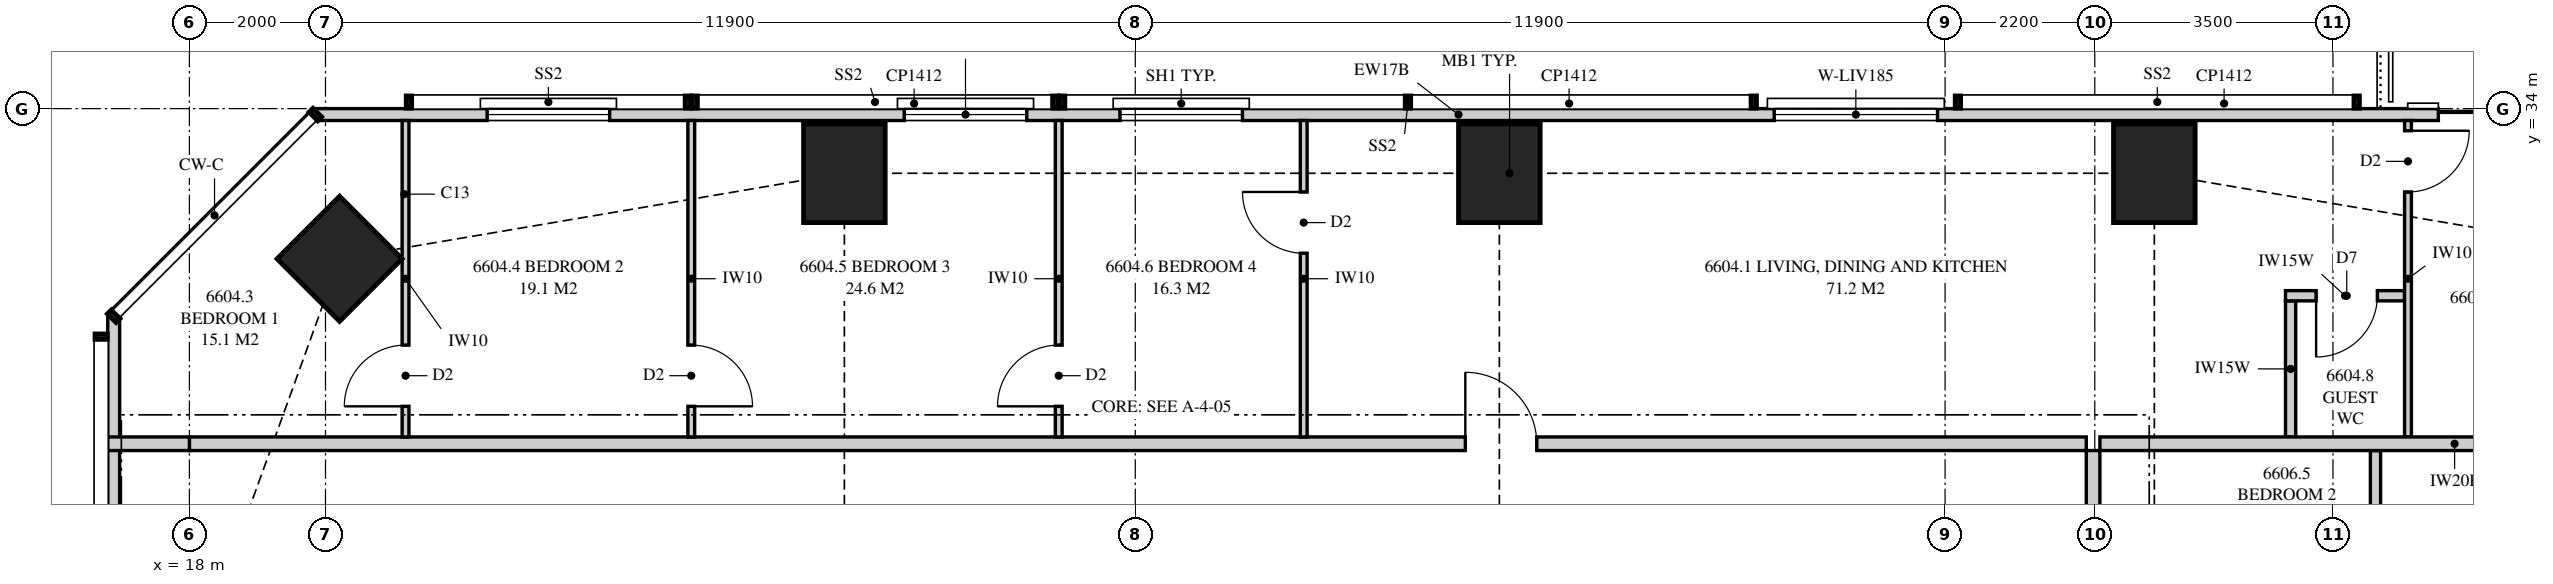
"""IFC4 building model, lengths in metres.
Left out: names, types, materials, properties, quantities, classifications, styles, units other than length and angle.
Written with IfcOpenShell. Run it as: python <this file> out.ifc"""

import sys

from ifc_helpers import new_model, si_unit, direction, frame, frame_2d, origin, origin_2d, place, context, subcontext, project, spatial, polyline, rectangle, outline, extrude, element, fill, save


model = new_model("IFC4")
c1 = context("Model", 3, precision=1e-05, world=origin(), true_north=direction((0.0, 1.0)))
c2 = subcontext(c1, "Body", "Model", "MODEL_VIEW")
j1 = project(units=[si_unit("LENGTHUNIT", "METRE"), si_unit("PLANEANGLEUNIT", "RADIAN")], contexts=[c1])
p1 = place(None, origin())
s1 = spatial("IfcSite", under=j1, at=p1, CompositionType="ELEMENT")
p2 = place(p1, origin())
s2 = spatial("IfcBuilding", under=s1, at=p2, CompositionType="ELEMENT")
p3 = place(p2, frame((0.0, 0.0, 242.45)))
s3 = spatial("IfcBuildingStorey", under=s2, at=p3, CompositionType="ELEMENT", Elevation=242.45)
for number, where, z_axis, x_axis in (
    (1, (46.875, 33.05, 0.0), (0.0, 0.0, 1.0), (0.0, 1.0, 0.0)),
    (2, (37.25, 33.05, 0.0), (0.0, 0.0, 1.0), (0.0, 1.0, 0.0)),
    (3, (27.625, 33.05, 0.0), (0.0, 0.0, 1.0), (0.0, 1.0, 0.0)),
):
    element("IfcColumn", number, at=place(p3, frame(where, z_axis=z_axis, x_axis=x_axis)), inside=s3, PredefinedType="COLUMN", context=c2, shape_type="SweptSolid", body=[
        extrude(rectangle(XDim=1.45, YDim=1.2, at=origin_2d()), origin(), (0.0, 0.0, 1.0), 3.5),
    ])
p4 = place(p3, frame((20.207, 31.793, 0.0), z_axis=(0.0, 0.0, 1.0), x_axis=(0.707106781187, 0.707106781187, 0.0)))
e4 = element("IfcColumn", 4, at=p4, inside=s3, PredefinedType="COLUMN", context=c2, shape_type="SweptSolid", body=[
    extrude(rectangle(XDim=1.3, YDim=1.3, at=origin_2d()), origin(), (0.0, 0.0, 1.0), 3.5),
])
p5 = place(p3, frame((53.449, 33.913, 0.0), z_axis=(0.0, 0.0, 1.0), x_axis=(-1.0, 0.0, 0.0)))
e5 = element("IfcWall", 5, at=p5, inside=s3, PredefinedType="SOLIDWALL", context=c2, shape_type="SweptSolid", body=[
    extrude(outline(polyline([(0.0, 0.0), (33.597, 0.0), (33.597, 3.26), (26.039, 3.26), (26.039, 2.3), (25.955, 2.3), (25.955, 3.26), (25.824, 3.26), (25.824, 2.3), (6.574, 2.3), (6.574, 3.26), (6.442, 3.26), (6.442, 2.3), (6.359, 2.3), (6.359, 3.26), (0.0, 3.26), (0.0, 0.0)])), frame((0.0, 0.087, 0.0), z_axis=(0.0, -1.0, 0.0), x_axis=(1.0, 0.0, 0.0)), (0.0, 0.0, 1.0), 0.175),
])
p6 = place(p5, frame((0.6, 0.0, 0.0)))
e6 = element("IfcOpeningElement", 6, at=p6, cuts=e5, PredefinedType="OPENING", context=c2, shape_type="SweptSolid", body=[
    extrude(rectangle(XDim=1.8, YDim=2.25, at=frame_2d((0.9, 1.125))), frame((0.0, 0.097, 0.0), z_axis=(0.0, -1.0, 0.0), x_axis=(1.0, 0.0, 0.0)), (0.0, 0.0, 1.0), 0.195),
])
p7 = place(p5, frame((9.76, 0.0, 0.4)))
e7 = element("IfcOpeningElement", 7, at=p7, cuts=e5, PredefinedType="OPENING", context=c2, shape_type="SweptSolid", body=[
    extrude(rectangle(XDim=2.4, YDim=1.85, at=frame_2d((1.2, 0.925))), frame((0.0, 0.097, 0.0), z_axis=(0.0, -1.0, 0.0), x_axis=(1.0, 0.0, 0.0)), (0.0, 0.0, 1.0), 0.195),
])
p8 = place(p5, frame((19.974, 0.0, 0.4)))
e8 = element("IfcOpeningElement", 8, at=p8, cuts=e5, PredefinedType="OPENING", context=c2, shape_type="SweptSolid", body=[
    extrude(rectangle(XDim=1.8, YDim=1.85, at=frame_2d((0.9, 0.925))), frame((0.0, 0.097, 0.0), z_axis=(0.0, -1.0, 0.0), x_axis=(1.0, 0.0, 0.0)), (0.0, 0.0, 1.0), 0.195),
])
p9 = place(p5, frame((23.144, 0.0, 0.4)))
e9 = element("IfcOpeningElement", 9, at=p9, cuts=e5, PredefinedType="OPENING", context=c2, shape_type="SweptSolid", body=[
    extrude(rectangle(XDim=1.8, YDim=1.85, at=frame_2d((0.9, 0.925))), frame((0.0, 0.097, 0.0), z_axis=(0.0, -1.0, 0.0), x_axis=(1.0, 0.0, 0.0)), (0.0, 0.0, 1.0), 0.195),
])
p10 = place(p5, frame((29.273, 0.0, 0.4)))
e10 = element("IfcOpeningElement", 10, at=p10, cuts=e5, PredefinedType="OPENING", context=c2, shape_type="SweptSolid", body=[
    extrude(rectangle(XDim=1.8, YDim=1.85, at=frame_2d((0.9, 0.925))), frame((0.0, 0.097, 0.0), z_axis=(0.0, -1.0, 0.0), x_axis=(1.0, 0.0, 0.0)), (0.0, 0.0, 1.0), 0.195),
])
p11 = place(p3, frame((16.887, 30.949, 0.0), z_axis=(0.0, 0.0, 1.0), x_axis=(0.0, -1.0, 0.0)))
e11 = element("IfcWall", 11, at=p11, inside=s3, PredefinedType="SOLIDWALL", context=c2, shape_type="SweptSolid", body=[
    extrude(outline(polyline([(0.0, 0.0), (27.897, 0.0), (27.897, 3.26), (18.148, 3.26), (18.148, 2.3), (18.125, 2.3), (18.125, 3.26), (17.949, 3.26), (17.949, 2.3), (5.949, 2.3), (5.949, 3.26), (0.0, 3.26), (0.0, 0.0)])), frame((0.0, 0.087, 0.0), z_axis=(0.0, -1.0, 0.0), x_axis=(1.0, 0.0, 0.0)), (0.0, 0.0, 1.0), 0.175),
])
p12 = place(p11, frame((11.849, 0.0, 0.4)))
e12 = element("IfcOpeningElement", 12, at=p12, cuts=e11, PredefinedType="OPENING", context=c2, shape_type="SweptSolid", body=[
    extrude(rectangle(XDim=1.2, YDim=1.85, at=frame_2d((0.6, 0.925))), frame((0.0, 0.097, 0.0), z_axis=(0.0, -1.0, 0.0), x_axis=(1.0, 0.0, 0.0)), (0.0, 0.0, 1.0), 0.195),
])
p13 = place(p11, frame((24.311, 0.0, 0.4)))
e13 = element("IfcOpeningElement", 13, at=p13, cuts=e11, PredefinedType="OPENING", context=c2, shape_type="SweptSolid", body=[
    extrude(rectangle(XDim=2.4, YDim=1.85, at=frame_2d((1.2, 0.925))), frame((0.0, 0.097, 0.0), z_axis=(0.0, -1.0, 0.0), x_axis=(1.0, 0.0, 0.0)), (0.0, 0.0, 1.0), 0.195),
])
p14 = place(p3, frame((18.0, 29.075, 0.0), z_axis=(0.0, 0.0, 1.0), x_axis=(1.0, 0.0, 0.0)))
e14 = element("IfcWall", 14, at=p14, inside=s3, PredefinedType="PARTITIONING", context=c2, shape_type="SweptSolid", body=[
    extrude(outline(polyline([(0.0, 0.0), (27.875, 0.0), (27.875, 3.26), (27.875, 2.66), (27.565, 2.66), (27.565, 3.26), (20.56, 3.26), (20.56, 2.66), (17.94, 2.66), (17.94, 3.26), (10.935, 3.26), (10.935, 2.66), (8.315, 2.66), (8.315, 3.26), (2.192, 3.26), (2.192, 2.3), (0.256, 2.3), (0.256, 3.26), (0.0, 3.26), (0.0, 0.0)])), frame((0.0, 0.1, 0.0), z_axis=(0.0, -1.0, 0.0), x_axis=(1.0, 0.0, 0.0)), (0.0, 0.0, 1.0), 0.2),
])
p15 = place(p14, frame((18.75, 0.0, 0.0)))
e15 = element("IfcOpeningElement", 15, at=p15, cuts=e14, PredefinedType="OPENING", context=c2, shape_type="SweptSolid", body=[
    extrude(rectangle(XDim=1.05, YDim=2.2, at=frame_2d((0.525, 1.1))), frame((0.0, 0.11, 0.0), z_axis=(0.0, -1.0, 0.0), x_axis=(1.0, 0.0, 0.0)), (0.0, 0.0, 1.0), 0.22),
])
p16 = place(p3, frame((21.176, 33.825, 0.0), z_axis=(0.0, 0.0, 1.0), x_axis=(0.0, -1.0, 0.0)))
e16 = element("IfcWall", 16, at=p16, inside=s3, PredefinedType="PARTITIONING", context=c2, shape_type="SweptSolid", body=[
    extrude(outline(polyline([(0.0, 0.0), (4.65, 0.0), (4.65, 3.26), (2.74, 3.26), (2.74, 2.3), (0.996, 2.3), (0.996, 3.26), (0.0, 3.26), (0.0, 0.0)])), frame((0.0, 0.05, 0.0), z_axis=(0.0, -1.0, 0.0), x_axis=(1.0, 0.0, 0.0)), (0.0, 0.0, 1.0), 0.1),
])
p17 = place(p16, frame((3.3, 0.0, 0.0)))
e17 = element("IfcOpeningElement", 17, at=p17, cuts=e16, PredefinedType="OPENING", context=c2, shape_type="SweptSolid", body=[
    extrude(rectangle(XDim=0.9, YDim=2.1, at=frame_2d((0.45, 1.05))), frame((0.0, 0.06, 0.0), z_axis=(0.0, -1.0, 0.0), x_axis=(1.0, 0.0, 0.0)), (0.0, 0.0, 1.0), 0.12),
])
p18 = place(p3, frame((25.375, 33.825, 0.0), z_axis=(0.0, 0.0, 1.0), x_axis=(0.0, -1.0, 0.0)))
e18 = element("IfcWall", 18, at=p18, inside=s3, PredefinedType="PARTITIONING", context=c2, shape_type="SweptSolid", body=[
    extrude(outline(polyline([(0.0, 0.0), (4.65, 0.0), (4.65, 3.26), (2.029, 3.26), (2.029, 2.3), (0.284, 2.3), (0.284, 3.26), (0.0, 3.26), (0.0, 0.0)])), frame((0.0, 0.05, 0.0), z_axis=(0.0, -1.0, 0.0), x_axis=(1.0, 0.0, 0.0)), (0.0, 0.0, 1.0), 0.1),
])
p19 = place(p18, frame((3.3, 0.0, 0.0)))
e19 = element("IfcOpeningElement", 19, at=p19, cuts=e18, PredefinedType="OPENING", context=c2, shape_type="SweptSolid", body=[
    extrude(rectangle(XDim=0.9, YDim=2.1, at=frame_2d((0.45, 1.05))), frame((0.0, 0.06, 0.0), z_axis=(0.0, -1.0, 0.0), x_axis=(1.0, 0.0, 0.0)), (0.0, 0.0, 1.0), 0.12),
])
p20 = place(p3, frame((30.775, 33.825, 0.0), z_axis=(0.0, 0.0, 1.0), x_axis=(0.0, -1.0, 0.0)))
e20 = element("IfcWall", 20, at=p20, inside=s3, PredefinedType="PARTITIONING", context=c2, shape_type="SweptSolid", body=[
    extrude(outline(polyline([(0.0, 0.0), (4.65, 0.0), (4.65, 3.26), (1.635, 3.26), (1.635, 2.3), (0.0, 2.3), (0.0, 3.26), (0.0, 0.0)])), frame((0.0, 0.05, 0.0), z_axis=(0.0, -1.0, 0.0), x_axis=(1.0, 0.0, 0.0)), (0.0, 0.0, 1.0), 0.1),
])
p21 = place(p20, frame((3.3, 0.0, 0.0)))
e21 = element("IfcOpeningElement", 21, at=p21, cuts=e20, PredefinedType="OPENING", context=c2, shape_type="SweptSolid", body=[
    extrude(rectangle(XDim=0.9, YDim=2.1, at=frame_2d((0.45, 1.05))), frame((0.0, 0.06, 0.0), z_axis=(0.0, -1.0, 0.0), x_axis=(1.0, 0.0, 0.0)), (0.0, 0.0, 1.0), 0.12),
])
p22 = place(p3, frame((34.375, 33.825, 0.0), z_axis=(0.0, 0.0, 1.0), x_axis=(0.0, -1.0, 0.0)))
e22 = element("IfcWall", 22, at=p22, inside=s3, PredefinedType="PARTITIONING", context=c2, shape_type="SweptSolid", body=[
    extrude(outline(polyline([(0.0, 0.0), (4.65, 0.0), (4.65, 3.26), (1.635, 3.26), (1.635, 2.3), (0.0, 2.3), (0.0, 3.26), (0.0, 0.0)])), frame((0.0, 0.05, 0.0), z_axis=(0.0, -1.0, 0.0), x_axis=(1.0, 0.0, 0.0)), (0.0, 0.0, 1.0), 0.1),
])
p23 = place(p22, frame((1.05, 0.0, 0.0)))
e23 = element("IfcOpeningElement", 23, at=p23, cuts=e22, PredefinedType="OPENING", context=c2, shape_type="SweptSolid", body=[
    extrude(rectangle(XDim=0.9, YDim=2.1, at=frame_2d((0.45, 1.05))), frame((0.0, 0.06, 0.0), z_axis=(0.0, -1.0, 0.0), x_axis=(1.0, 0.0, 0.0)), (0.0, 0.0, 1.0), 0.12),
])
p24 = place(p3, frame((50.603, 33.825, 0.0), z_axis=(0.0, 0.0, 1.0), x_axis=(0.0, -1.0, 0.0)))
e24 = element("IfcWall", 24, at=p24, inside=s3, PredefinedType="PARTITIONING", context=c2, shape_type="SweptSolid", body=[
    extrude(outline(polyline([(0.0, 0.0), (4.65, 0.0), (4.65, 3.26), (2.279, 3.26), (2.279, 2.3), (0.534, 2.3), (0.534, 3.26), (0.0, 3.26), (0.0, 0.0)])), frame((0.0, 0.05, 0.0), z_axis=(0.0, -1.0, 0.0), x_axis=(1.0, 0.0, 0.0)), (0.0, 0.0, 1.0), 0.1),
])
p25 = place(p24, frame((0.15, 0.0, 0.0)))
e25 = element("IfcOpeningElement", 25, at=p25, cuts=e24, PredefinedType="OPENING", context=c2, shape_type="SweptSolid", body=[
    extrude(rectangle(XDim=0.9, YDim=2.1, at=frame_2d((0.45, 1.05))), frame((0.0, 0.06, 0.0), z_axis=(0.0, -1.0, 0.0), x_axis=(1.0, 0.0, 0.0)), (0.0, 0.0, 1.0), 0.12),
])
p26 = place(p3, frame((16.8, 29.075, 0.0), z_axis=(0.0, 0.0, 1.0), x_axis=(1.0, 0.0, 0.0)))
e26 = element("IfcWall", 26, at=p26, inside=s3, PredefinedType="PARTITIONING", context=c2, shape_type="SweptSolid", body=[
    extrude(rectangle(XDim=1.2, YDim=0.2, at=frame_2d((0.6, 0.0))), origin(), (0.0, 0.0, 1.0), 3.26),
])
p27 = place(p3, frame((46.075, 29.075, 0.0), z_axis=(0.0, 0.0, 1.0), x_axis=(1.0, 0.0, 0.0)))
e27 = element("IfcWall", 27, at=p27, inside=s3, PredefinedType="PARTITIONING", context=c2, shape_type="SweptSolid", body=[
    extrude(outline(polyline([(0.0, 0.0), (10.425, 0.0), (10.425, 3.26), (9.646, 3.26), (9.646, 2.3), (7.795, 2.3), (7.795, 3.26), (2.11, 3.26), (2.11, 2.66), (0.0, 2.66), (0.0, 3.26), (0.0, 0.0)])), frame((0.0, 0.1, 0.0), z_axis=(0.0, -1.0, 0.0), x_axis=(1.0, 0.0, 0.0)), (0.0, 0.0, 1.0), 0.2),
])
p28 = place(p3, frame((45.975, 25.0, 0.0), z_axis=(0.0, 0.0, 1.0), x_axis=(0.0, 1.0, 0.0)))
e28 = element("IfcWall", 28, at=p28, inside=s3, PredefinedType="PARTITIONING", context=c2, shape_type="SweptSolid", body=[
    extrude(rectangle(XDim=3.975, YDim=0.2, at=frame_2d((1.988, 0.0))), origin(), (0.0, 0.0, 1.0), 2.66),
])
p29 = place(p3, frame((50.125, 25.85, 0.0), z_axis=(0.0, 0.0, 1.0), x_axis=(0.0, 1.0, 0.0)))
e29 = element("IfcWall", 29, at=p29, inside=s3, PredefinedType="PLUMBINGWALL", context=c2, shape_type="SweptSolid", body=[
    extrude(outline(polyline([(0.0, 0.0), (3.125, 0.0), (3.125, 3.26), (0.435, 3.26), (0.435, 2.66), (0.0, 2.66), (0.0, 3.26), (0.0, 0.0)])), frame((0.0, 0.075, 0.0), z_axis=(0.0, -1.0, 0.0), x_axis=(1.0, 0.0, 0.0)), (0.0, 0.0, 1.0), 0.15),
])
p30 = place(p29, frame((0.4, 0.0, 0.0)))
e30 = element("IfcOpeningElement", 30, at=p30, cuts=e29, PredefinedType="OPENING", context=c2, shape_type="SweptSolid", body=[
    extrude(rectangle(XDim=0.9, YDim=2.1, at=frame_2d((0.45, 1.05))), frame((0.0, 0.085, 0.0), z_axis=(0.0, -1.0, 0.0), x_axis=(1.0, 0.0, 0.0)), (0.0, 0.0, 1.0), 0.17),
])
p31 = place(p3, frame((50.552, 31.25, 0.0), z_axis=(0.0, 0.0, 1.0), x_axis=(-1.0, 0.0, 0.0)))
e31 = element("IfcWall", 31, at=p31, inside=s3, PredefinedType="PLUMBINGWALL", context=c2, shape_type="SweptSolid", body=[
    extrude(rectangle(XDim=1.75, YDim=0.15, at=frame_2d((0.875, 0.0))), origin(), (0.0, 0.0, 1.0), 3.26),
])
p32 = place(p31, frame((0.4, 0.0, 0.0)))
e32 = element("IfcOpeningElement", 32, at=p32, cuts=e31, PredefinedType="OPENING", context=c2, shape_type="SweptSolid", body=[
    extrude(rectangle(XDim=0.9, YDim=2.1, at=frame_2d((0.45, 1.05))), frame((0.0, 0.085, 0.0), z_axis=(0.0, -1.0, 0.0), x_axis=(1.0, 0.0, 0.0)), (0.0, 0.0, 1.0), 0.17),
])
p33 = place(p3, frame((48.877, 29.175, 0.0), z_axis=(0.0, 0.0, 1.0), x_axis=(0.0, 1.0, 0.0)))
e33 = element("IfcWall", 33, at=p33, inside=s3, PredefinedType="PLUMBINGWALL", context=c2, shape_type="SweptSolid", body=[
    extrude(rectangle(XDim=2.0, YDim=0.15, at=frame_2d((1.0, 0.0))), origin(), (0.0, 0.0, 1.0), 3.26),
])
p34 = place(p6, origin())
e34 = element("IfcDoor", 34, at=p34, inside=s3, OperationType="SLIDING_TO_LEFT", PredefinedType="DOOR", context=c2, shape_type="SweptSolid", body=[
    extrude(rectangle(XDim=1.8, YDim=2.25, at=frame_2d((0.9, 1.125))), frame((0.0, 0.025, 0.0), z_axis=(0.0, -1.0, 0.0), x_axis=(1.0, 0.0, 0.0)), (0.0, 0.0, 1.0), 0.05),
])
fill(e6, e34)
p35 = place(p7, origin())
e35 = element("IfcWindow", 35, at=p35, inside=s3, PartitioningType="SINGLE_PANEL", PredefinedType="WINDOW", context=c2, shape_type="SweptSolid", body=[
    extrude(rectangle(XDim=2.4, YDim=1.85, at=frame_2d((1.2, 0.925))), frame((0.0, 0.03, 0.0), z_axis=(0.0, -1.0, 0.0), x_axis=(1.0, 0.0, 0.0)), (0.0, 0.0, 1.0), 0.06),
])
fill(e7, e35)
p36 = place(p8, origin())
e36 = element("IfcWindow", 36, at=p36, inside=s3, PartitioningType="SINGLE_PANEL", PredefinedType="WINDOW", context=c2, shape_type="SweptSolid", body=[
    extrude(rectangle(XDim=1.8, YDim=1.85, at=frame_2d((0.9, 0.925))), frame((0.0, 0.03, 0.0), z_axis=(0.0, -1.0, 0.0), x_axis=(1.0, 0.0, 0.0)), (0.0, 0.0, 1.0), 0.06),
])
fill(e8, e36)
p37 = place(p9, origin())
e37 = element("IfcWindow", 37, at=p37, inside=s3, PartitioningType="SINGLE_PANEL", PredefinedType="WINDOW", context=c2, shape_type="SweptSolid", body=[
    extrude(rectangle(XDim=1.8, YDim=1.85, at=frame_2d((0.9, 0.925))), frame((0.0, 0.03, 0.0), z_axis=(0.0, -1.0, 0.0), x_axis=(1.0, 0.0, 0.0)), (0.0, 0.0, 1.0), 0.06),
])
fill(e9, e37)
p38 = place(p10, origin())
e38 = element("IfcWindow", 38, at=p38, inside=s3, PartitioningType="SINGLE_PANEL", PredefinedType="WINDOW", context=c2, shape_type="SweptSolid", body=[
    extrude(rectangle(XDim=1.8, YDim=1.85, at=frame_2d((0.9, 0.925))), frame((0.0, 0.03, 0.0), z_axis=(0.0, -1.0, 0.0), x_axis=(1.0, 0.0, 0.0)), (0.0, 0.0, 1.0), 0.06),
])
fill(e10, e38)
p39 = place(p15, origin())
e39 = element("IfcDoor", 39, at=p39, inside=s3, OperationType="SINGLE_SWING_LEFT", PredefinedType="DOOR", context=c2, shape_type="SweptSolid", body=[
    extrude(rectangle(XDim=1.05, YDim=2.2, at=frame_2d((0.525, 1.1))), frame((0.0, 0.025, 0.0), z_axis=(0.0, -1.0, 0.0), x_axis=(1.0, 0.0, 0.0)), (0.0, 0.0, 1.0), 0.05),
])
fill(e15, e39)
p40 = place(p17, frame((0.9, 0.0, 0.0), z_axis=(0.0, 0.0, 1.0), x_axis=(-1.0, 0.0, 0.0)))
e40 = element("IfcDoor", 40, at=p40, inside=s3, OperationType="SINGLE_SWING_LEFT", PredefinedType="DOOR", context=c2, shape_type="SweptSolid", body=[
    extrude(rectangle(XDim=0.9, YDim=2.1, at=frame_2d((0.45, 1.05))), frame((0.0, 0.025, 0.0), z_axis=(0.0, -1.0, 0.0), x_axis=(1.0, 0.0, 0.0)), (0.0, 0.0, 1.0), 0.05),
])
fill(e17, e40)
p41 = place(p19, origin())
e41 = element("IfcDoor", 41, at=p41, inside=s3, OperationType="SINGLE_SWING_RIGHT", PredefinedType="DOOR", context=c2, shape_type="SweptSolid", body=[
    extrude(rectangle(XDim=0.9, YDim=2.1, at=frame_2d((0.45, 1.05))), frame((0.0, 0.025, 0.0), z_axis=(0.0, -1.0, 0.0), x_axis=(1.0, 0.0, 0.0)), (0.0, 0.0, 1.0), 0.05),
])
fill(e19, e41)
p42 = place(p21, frame((0.9, 0.0, 0.0), z_axis=(0.0, 0.0, 1.0), x_axis=(-1.0, 0.0, 0.0)))
e42 = element("IfcDoor", 42, at=p42, inside=s3, OperationType="SINGLE_SWING_LEFT", PredefinedType="DOOR", context=c2, shape_type="SweptSolid", body=[
    extrude(rectangle(XDim=0.9, YDim=2.1, at=frame_2d((0.45, 1.05))), frame((0.0, 0.025, 0.0), z_axis=(0.0, -1.0, 0.0), x_axis=(1.0, 0.0, 0.0)), (0.0, 0.0, 1.0), 0.05),
])
fill(e21, e42)
p43 = place(p23, frame((0.9, 0.0, 0.0), z_axis=(0.0, 0.0, 1.0), x_axis=(-1.0, 0.0, 0.0)))
e43 = element("IfcDoor", 43, at=p43, inside=s3, OperationType="SINGLE_SWING_RIGHT", PredefinedType="DOOR", context=c2, shape_type="SweptSolid", body=[
    extrude(rectangle(XDim=0.9, YDim=2.1, at=frame_2d((0.45, 1.05))), frame((0.0, 0.025, 0.0), z_axis=(0.0, -1.0, 0.0), x_axis=(1.0, 0.0, 0.0)), (0.0, 0.0, 1.0), 0.05),
])
fill(e23, e43)
p44 = place(p25, origin())
e44 = element("IfcDoor", 44, at=p44, inside=s3, OperationType="SINGLE_SWING_LEFT", PredefinedType="DOOR", context=c2, shape_type="SweptSolid", body=[
    extrude(rectangle(XDim=0.9, YDim=2.1, at=frame_2d((0.45, 1.05))), frame((0.0, 0.025, 0.0), z_axis=(0.0, -1.0, 0.0), x_axis=(1.0, 0.0, 0.0)), (0.0, 0.0, 1.0), 0.05),
])
fill(e25, e44)
p45 = place(p32, origin())
e45 = element("IfcDoor", 45, at=p45, inside=s3, OperationType="SINGLE_SWING_RIGHT", PredefinedType="DOOR", context=c2, shape_type="SweptSolid", body=[
    extrude(rectangle(XDim=0.9, YDim=2.1, at=frame_2d((0.45, 1.05))), frame((0.0, 0.025, 0.0), z_axis=(0.0, -1.0, 0.0), x_axis=(1.0, 0.0, 0.0)), (0.0, 0.0, 1.0), 0.05),
])
fill(e32, e45)
save(model, sys.argv[1])
